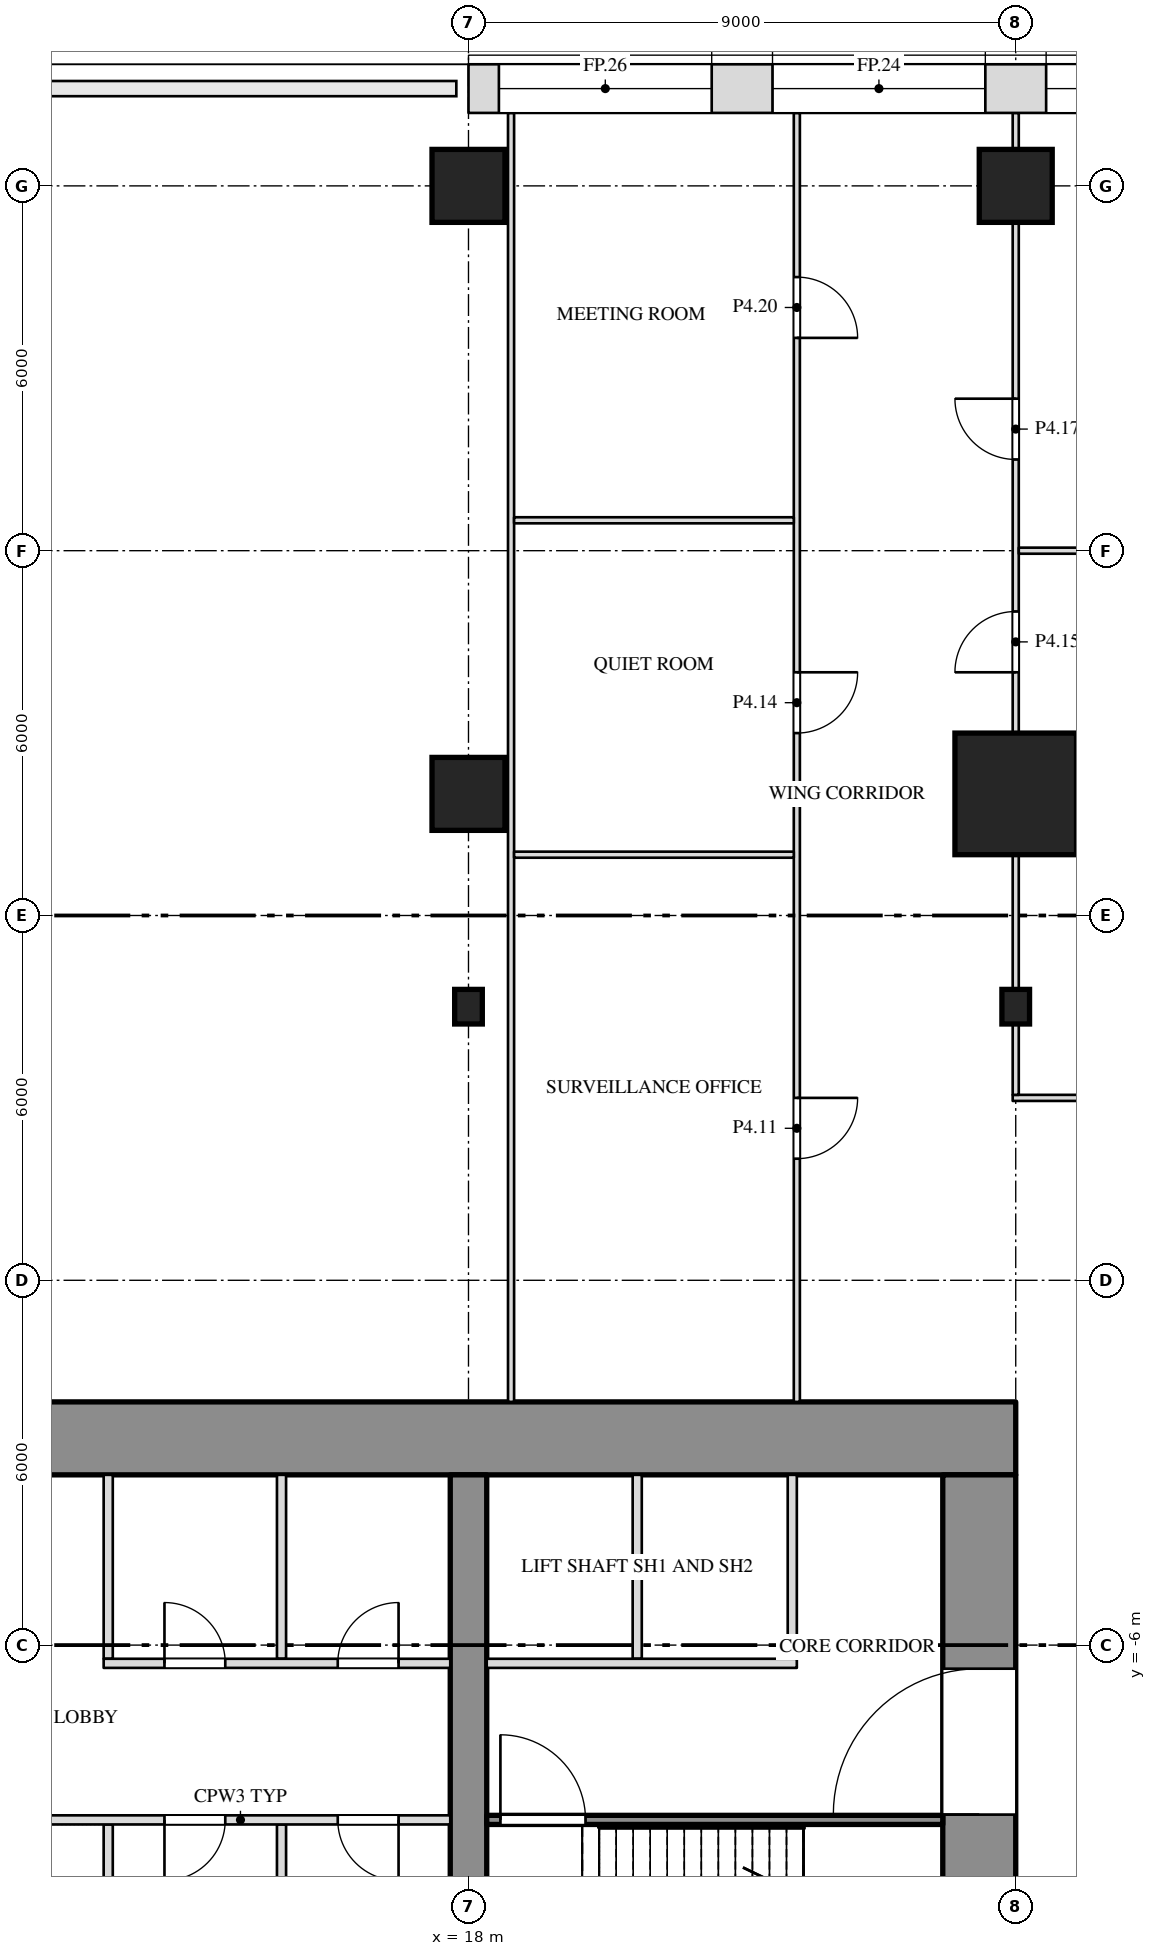
"""IFC4 building model, lengths in metres.
Left out: names, types, materials, properties, quantities, classifications, styles, units other than length and angle.
Written with IfcOpenShell. Run it as: python <this file> out.ifc"""

import sys

from ifc_helpers import new_model, si_unit, direction, frame, frame_2d, origin, origin_2d, place, context, subcontext, project, spatial, rectangle, i_section, extrude, element, fill, save


model = new_model("IFC4")
c1 = context("Model", 3, precision=1e-05, world=origin(), true_north=direction((0.0, 1.0)))
c2 = subcontext(c1, "Body", "Model", "MODEL_VIEW")
j1 = project(units=[si_unit("LENGTHUNIT", "METRE"), si_unit("PLANEANGLEUNIT", "RADIAN")], contexts=[c1])
p1 = place(None, origin())
s1 = spatial("IfcSite", under=j1, at=p1, CompositionType="ELEMENT")
p2 = place(p1, origin())
s2 = spatial("IfcBuilding", under=s1, at=p2, CompositionType="ELEMENT")
p3 = place(p2, frame((0.0, 0.0, 27.0)))
s3 = spatial("IfcBuildingStorey", under=s2, at=p3, CompositionType="ELEMENT", Elevation=27.0)
for number, where, z_axis, x_axis in (
    (1, (18.0, 4.5, 0.0), (0.0, 0.0, 1.0), (1.0, 0.0, 0.0)),
    (2, (27.0, 4.5, 0.0), (0.0, 0.0, 1.0), (1.0, 0.0, 0.0)),
):
    element("IfcColumn", number, at=place(p3, frame(where, z_axis=z_axis, x_axis=x_axis)), inside=s3, PredefinedType="COLUMN", context=c2, shape_type="SweptSolid", body=[
        extrude(i_section(OverallWidth=0.455, OverallDepth=0.569, WebThickness=0.078, FlangeThickness=0.125, at=origin_2d()), origin(), (0.0, 0.0, 1.0), 6.0),
    ])
p4 = place(p3, frame((18.0, 8.0, 0.0), z_axis=(0.0, 0.0, 1.0), x_axis=(1.0, 0.0, 0.0)))
e3 = element("IfcColumn", 3, at=p4, inside=s3, PredefinedType="COLUMN", context=c2, shape_type="SweptSolid", body=[
    extrude(rectangle(XDim=1.2, YDim=1.2, at=origin_2d()), origin(), (0.0, 0.0, 1.0), 6.0),
])
p5 = place(p3, frame((27.0, 8.0, 0.0), z_axis=(0.0, 0.0, 1.0), x_axis=(1.0, 0.0, 0.0)))
e4 = element("IfcColumn", 4, at=p5, inside=s3, PredefinedType="COLUMN", context=c2, shape_type="SweptSolid", body=[
    extrude(rectangle(XDim=2.0, YDim=2.0, at=origin_2d()), origin(), (0.0, 0.0, 1.0), 6.0),
])
for number, where, z_axis, x_axis in (
    (5, (18.0, 18.0, 0.0), (0.0, 0.0, 1.0), (1.0, 0.0, 0.0)),
    (6, (27.0, 18.0, 0.0), (0.0, 0.0, 1.0), (1.0, 0.0, 0.0)),
):
    element("IfcColumn", number, at=place(p3, frame(where, z_axis=z_axis, x_axis=x_axis)), inside=s3, PredefinedType="COLUMN", context=c2, shape_type="SweptSolid", body=[
        extrude(rectangle(XDim=1.2, YDim=1.2, at=origin_2d()), origin(), (0.0, 0.0, 1.0), 6.0),
    ])
p6 = place(p3, frame((-27.0, -2.6, 0.0), z_axis=(0.0, 0.0, 1.0), x_axis=(1.0, 0.0, 0.0)))
e7 = element("IfcWall", 7, at=p6, inside=s3, PredefinedType="SHEAR", context=c2, shape_type="SweptSolid", body=[
    extrude(rectangle(XDim=54.0, YDim=1.2, at=frame_2d((27.0, 0.0))), origin(), (0.0, 0.0, 1.0), 5.7),
])
p7 = place(p3, frame((26.4, -12.8, 0.0), z_axis=(0.0, 0.0, 1.0), x_axis=(0.0, 1.0, 0.0)))
e8 = element("IfcWall", 8, at=p7, inside=s3, PredefinedType="SHEAR", context=c2, shape_type="SweptSolid", body=[
    extrude(rectangle(XDim=9.6, YDim=1.2, at=frame_2d((4.8, 0.0))), origin(), (0.0, 0.0, 1.0), 5.7),
])
p8 = place(p7, frame((4.012, 0.0, 0.0)))
e9 = element("IfcOpeningElement", 9, at=p8, cuts=e8, PredefinedType="OPENING", context=c2, shape_type="SweptSolid", body=[
    extrude(rectangle(XDim=2.4, YDim=2.1, at=frame_2d((1.2, 1.05))), frame((0.0, 0.612, 0.0), z_axis=(0.0, -1.0, 0.0), x_axis=(1.0, 0.0, 0.0)), (0.0, 0.0, 1.0), 1.224),
])
p9 = place(p3, frame((18.0, -12.8, 0.0), z_axis=(0.0, 0.0, 1.0), x_axis=(0.0, 1.0, 0.0)))
e10 = element("IfcWall", 10, at=p9, inside=s3, PredefinedType="SHEAR", context=c2, shape_type="SweptSolid", body=[
    extrude(rectangle(XDim=9.6, YDim=0.6, at=frame_2d((4.8, 0.0))), origin(), (0.0, 0.0, 1.0), 5.7),
])
p10 = place(p3, frame((18.7, -2.0, 0.0), z_axis=(0.0, 0.0, 1.0), x_axis=(0.0, 1.0, 0.0)))
e11 = element("IfcWall", 11, at=p10, inside=s3, PredefinedType="PARTITIONING", context=c2, shape_type="SweptSolid", body=[
    extrude(rectangle(XDim=21.2, YDim=0.1, at=frame_2d((10.6, 0.0))), origin(), (0.0, 0.0, 1.0), 5.7),
])
p11 = place(p3, frame((23.4, -2.0, 0.0), z_axis=(0.0, 0.0, 1.0), x_axis=(0.0, 1.0, 0.0)))
e12 = element("IfcWall", 12, at=p11, inside=s3, PredefinedType="PARTITIONING", context=c2, shape_type="SweptSolid", body=[
    extrude(rectangle(XDim=21.2, YDim=0.1, at=frame_2d((10.6, 0.0))), origin(), (0.0, 0.0, 1.0), 5.7),
])
p12 = place(p11, frame((4.0, 0.0, 0.0)))
e13 = element("IfcOpeningElement", 13, at=p12, cuts=e12, PredefinedType="OPENING", context=c2, shape_type="SweptSolid", body=[
    extrude(rectangle(XDim=1.0, YDim=2.1, at=frame_2d((0.5, 1.05))), frame((0.0, 0.062, 0.0), z_axis=(0.0, -1.0, 0.0), x_axis=(1.0, 0.0, 0.0)), (0.0, 0.0, 1.0), 0.124),
])
p13 = place(p11, frame((11.0, 0.0, 0.0)))
e14 = element("IfcOpeningElement", 14, at=p13, cuts=e12, PredefinedType="OPENING", context=c2, shape_type="SweptSolid", body=[
    extrude(rectangle(XDim=1.0, YDim=2.1, at=frame_2d((0.5, 1.05))), frame((0.0, 0.062, 0.0), z_axis=(0.0, -1.0, 0.0), x_axis=(1.0, 0.0, 0.0)), (0.0, 0.0, 1.0), 0.124),
])
p14 = place(p11, frame((17.5, 0.0, 0.0)))
e15 = element("IfcOpeningElement", 15, at=p14, cuts=e12, PredefinedType="OPENING", context=c2, shape_type="SweptSolid", body=[
    extrude(rectangle(XDim=1.0, YDim=2.1, at=frame_2d((0.5, 1.05))), frame((0.0, 0.062, 0.0), z_axis=(0.0, -1.0, 0.0), x_axis=(1.0, 0.0, 0.0)), (0.0, 0.0, 1.0), 0.124),
])
p15 = place(p3, frame((26.95, 3.0, 0.0), z_axis=(0.0, 0.0, 1.0), x_axis=(1.0, 0.0, 0.0)))
e16 = element("IfcWall", 16, at=p15, inside=s3, PredefinedType="PARTITIONING", context=c2, shape_type="SweptSolid", body=[
    extrude(rectangle(XDim=11.25, YDim=0.1, at=frame_2d((5.625, 0.0))), origin(), (0.0, 0.0, 1.0), 5.7),
])
p16 = place(p3, frame((27.0, 3.05, 0.0), z_axis=(0.0, 0.0, 1.0), x_axis=(0.0, 1.0, 0.0)))
e17 = element("IfcWall", 17, at=p16, inside=s3, PredefinedType="PARTITIONING", context=c2, shape_type="SweptSolid", body=[
    extrude(rectangle(XDim=1.166, YDim=0.1, at=frame_2d((0.583, 0.0))), origin(), (0.0, 0.0, 1.0), 5.088),
])
p17 = place(p3, frame((27.0, 4.784, 0.0), z_axis=(0.0, 0.0, 1.0), x_axis=(0.0, 1.0, 0.0)))
e18 = element("IfcWall", 18, at=p17, inside=s3, PredefinedType="PARTITIONING", context=c2, shape_type="SweptSolid", body=[
    extrude(rectangle(XDim=2.216, YDim=0.1, at=frame_2d((1.108, 0.0))), origin(), (0.0, 0.0, 1.0), 5.088),
])
p18 = place(p3, frame((27.0, 9.0, 0.0), z_axis=(0.0, 0.0, 1.0), x_axis=(0.0, 1.0, 0.0)))
e19 = element("IfcWall", 19, at=p18, inside=s3, PredefinedType="PARTITIONING", context=c2, shape_type="SweptSolid", body=[
    extrude(rectangle(XDim=8.4, YDim=0.1, at=frame_2d((4.2, 0.0))), origin(), (0.0, 0.0, 1.0), 5.088),
])
p19 = place(p18, frame((1.0, 0.0, 0.0)))
e20 = element("IfcOpeningElement", 20, at=p19, cuts=e19, PredefinedType="OPENING", context=c2, shape_type="SweptSolid", body=[
    extrude(rectangle(XDim=1.0, YDim=2.1, at=frame_2d((0.5, 1.05))), frame((0.0, 0.062, 0.0), z_axis=(0.0, -1.0, 0.0), x_axis=(1.0, 0.0, 0.0)), (0.0, 0.0, 1.0), 0.124),
])
p20 = place(p18, frame((4.5, 0.0, 0.0)))
e21 = element("IfcOpeningElement", 21, at=p20, cuts=e19, PredefinedType="OPENING", context=c2, shape_type="SweptSolid", body=[
    extrude(rectangle(XDim=1.0, YDim=2.1, at=frame_2d((0.5, 1.05))), frame((0.0, 0.062, 0.0), z_axis=(0.0, -1.0, 0.0), x_axis=(1.0, 0.0, 0.0)), (0.0, 0.0, 1.0), 0.124),
])
p21 = place(p3, frame((27.0, 18.6, 0.0), z_axis=(0.0, 0.0, 1.0), x_axis=(0.0, 1.0, 0.0)))
e22 = element("IfcWall", 22, at=p21, inside=s3, PredefinedType="PARTITIONING", context=c2, shape_type="SweptSolid", body=[
    extrude(rectangle(XDim=0.6, YDim=0.1, at=frame_2d((0.3, 0.0))), origin(), (0.0, 0.0, 1.0), 5.7),
])
p22 = place(p3, frame((18.75, 7.0, 0.0), z_axis=(0.0, 0.0, 1.0), x_axis=(1.0, 0.0, 0.0)))
e23 = element("IfcWall", 23, at=p22, inside=s3, PredefinedType="PARTITIONING", context=c2, shape_type="SweptSolid", body=[
    extrude(rectangle(XDim=4.6, YDim=0.1, at=frame_2d((2.3, 0.0))), origin(), (0.0, 0.0, 1.0), 5.7),
])
p23 = place(p3, frame((27.05, 12.0, 0.0), z_axis=(0.0, 0.0, 1.0), x_axis=(1.0, 0.0, 0.0)))
e24 = element("IfcWall", 24, at=p23, inside=s3, PredefinedType="PARTITIONING", context=c2, shape_type="SweptSolid", body=[
    extrude(rectangle(XDim=11.15, YDim=0.1, at=frame_2d((5.575, 0.0))), origin(), (0.0, 0.0, 1.0), 5.7),
])
p24 = place(p3, frame((18.75, 12.5, 0.0), z_axis=(0.0, 0.0, 1.0), x_axis=(1.0, 0.0, 0.0)))
e25 = element("IfcWall", 25, at=p24, inside=s3, PredefinedType="PARTITIONING", context=c2, shape_type="SweptSolid", body=[
    extrude(rectangle(XDim=4.6, YDim=0.1, at=frame_2d((2.3, 0.0))), origin(), (0.0, 0.0, 1.0), 5.7),
])
p25 = place(p3, frame((32.948, 19.6, 0.0), z_axis=(0.0, 0.0, 1.0), x_axis=(-1.0, 0.0, 0.0)))
e26 = element("IfcWall", 26, at=p25, inside=s3, PredefinedType="SOLIDWALL", context=c2, shape_type="SweptSolid", body=[
    extrude(rectangle(XDim=14.948, YDim=0.8, at=frame_2d((7.474, 0.0))), origin(), (0.0, 0.0, 1.0), 5.7),
])
p26 = place(p25, frame((1.948, 0.0, 1.0)))
e27 = element("IfcOpeningElement", 27, at=p26, cuts=e26, PredefinedType="OPENING", context=c2, shape_type="SweptSolid", body=[
    extrude(rectangle(XDim=3.5, YDim=4.0, at=frame_2d((1.75, 2.0))), frame((0.0, 0.412, 0.0), z_axis=(0.0, -1.0, 0.0), x_axis=(1.0, 0.0, 0.0)), (0.0, 0.0, 1.0), 0.824),
])
p27 = place(p25, frame((6.448, 0.0, 1.0)))
e28 = element("IfcOpeningElement", 28, at=p27, cuts=e26, PredefinedType="OPENING", context=c2, shape_type="SweptSolid", body=[
    extrude(rectangle(XDim=3.5, YDim=4.0, at=frame_2d((1.75, 2.0))), frame((0.0, 0.412, 0.0), z_axis=(0.0, -1.0, 0.0), x_axis=(1.0, 0.0, 0.0)), (0.0, 0.0, 1.0), 0.824),
])
p28 = place(p25, frame((10.948, 0.0, 1.0)))
e29 = element("IfcOpeningElement", 29, at=p28, cuts=e26, PredefinedType="OPENING", context=c2, shape_type="SweptSolid", body=[
    extrude(rectangle(XDim=3.5, YDim=4.0, at=frame_2d((1.75, 2.0))), frame((0.0, 0.412, 0.0), z_axis=(0.0, -1.0, 0.0), x_axis=(1.0, 0.0, 0.0)), (0.0, 0.0, 1.0), 0.824),
])
for number, where, z_axis, x_axis in (
    (30, (12.075, -6.225, 0.0), (0.0, 0.0, 1.0), (0.0, 1.0, 0.0)),
    (31, (14.925, -6.225, 0.0), (0.0, 0.0, 1.0), (0.0, 1.0, 0.0)),
    (32, (20.775, -6.225, 0.0), (0.0, 0.0, 1.0), (0.0, 1.0, 0.0)),
    (33, (23.325, -6.225, 0.0), (0.0, 0.0, 1.0), (0.0, 1.0, 0.0)),
):
    element("IfcWall", number, at=place(p3, frame(where, z_axis=z_axis, x_axis=x_axis)), inside=s3, PredefinedType="PARTITIONING", context=c2, shape_type="SweptSolid", body=[
        extrude(rectangle(XDim=3.025, YDim=0.15, at=frame_2d((1.513, 0.0))), origin(), (0.0, 0.0, 1.0), 5.7),
    ])
for number, where, z_axis, x_axis in (
    (34, (12.075, -12.8, 0.0), (0.0, 0.0, 1.0), (0.0, 1.0, 0.0)),
    (35, (14.925, -12.8, 0.0), (0.0, 0.0, 1.0), (0.0, 1.0, 0.0)),
):
    element("IfcWall", number, at=place(p3, frame(where, z_axis=z_axis, x_axis=x_axis)), inside=s3, PredefinedType="PARTITIONING", context=c2, shape_type="SweptSolid", body=[
        extrude(rectangle(XDim=3.85, YDim=0.15, at=frame_2d((1.925, 0.0))), origin(), (0.0, 0.0, 1.0), 5.7),
    ])
p29 = place(p3, frame((12.0, -6.3, 0.0), z_axis=(0.0, 0.0, 1.0), x_axis=(1.0, 0.0, 0.0)))
e36 = element("IfcWall", 36, at=p29, inside=s3, PredefinedType="PARTITIONING", context=c2, shape_type="SweptSolid", body=[
    extrude(rectangle(XDim=5.7, YDim=0.15, at=frame_2d((2.85, 0.0))), origin(), (0.0, 0.0, 1.0), 5.7),
])
p30 = place(p29, frame((1.0, 0.0, 0.0)))
e37 = element("IfcOpeningElement", 37, at=p30, cuts=e36, PredefinedType="OPENING", context=c2, shape_type="SweptSolid", body=[
    extrude(rectangle(XDim=1.0, YDim=2.1, at=frame_2d((0.5, 1.05))), frame((0.0, 0.087, 0.0), z_axis=(0.0, -1.0, 0.0), x_axis=(1.0, 0.0, 0.0)), (0.0, 0.0, 1.0), 0.174),
])
p31 = place(p29, frame((3.85, 0.0, 0.0)))
e38 = element("IfcOpeningElement", 38, at=p31, cuts=e36, PredefinedType="OPENING", context=c2, shape_type="SweptSolid", body=[
    extrude(rectangle(XDim=1.0, YDim=2.1, at=frame_2d((0.5, 1.05))), frame((0.0, 0.087, 0.0), z_axis=(0.0, -1.0, 0.0), x_axis=(1.0, 0.0, 0.0)), (0.0, 0.0, 1.0), 0.174),
])
p32 = place(p3, frame((18.3, -6.3, 0.0), z_axis=(0.0, 0.0, 1.0), x_axis=(1.0, 0.0, 0.0)))
e39 = element("IfcWall", 39, at=p32, inside=s3, PredefinedType="PARTITIONING", context=c2, shape_type="SweptSolid", body=[
    extrude(rectangle(XDim=5.1, YDim=0.15, at=frame_2d((2.55, 0.0))), origin(), (0.0, 0.0, 1.0), 5.7),
])
p33 = place(p3, frame((10.8, -8.875, 0.0), z_axis=(0.0, 0.0, 1.0), x_axis=(1.0, 0.0, 0.0)))
e40 = element("IfcWall", 40, at=p33, inside=s3, PredefinedType="PARTITIONING", context=c2, shape_type="SweptSolid", body=[
    extrude(rectangle(XDim=6.9, YDim=0.15, at=frame_2d((3.45, 0.0))), origin(), (0.0, 0.0, 1.0), 5.7),
])
p34 = place(p33, frame((2.2, 0.0, 0.0)))
e41 = element("IfcOpeningElement", 41, at=p34, cuts=e40, PredefinedType="OPENING", context=c2, shape_type="SweptSolid", body=[
    extrude(rectangle(XDim=1.0, YDim=2.1, at=frame_2d((0.5, 1.05))), frame((0.0, 0.087, 0.0), z_axis=(0.0, -1.0, 0.0), x_axis=(1.0, 0.0, 0.0)), (0.0, 0.0, 1.0), 0.174),
])
p35 = place(p33, frame((5.05, 0.0, 0.0)))
e42 = element("IfcOpeningElement", 42, at=p35, cuts=e40, PredefinedType="OPENING", context=c2, shape_type="SweptSolid", body=[
    extrude(rectangle(XDim=1.0, YDim=2.1, at=frame_2d((0.5, 1.05))), frame((0.0, 0.087, 0.0), z_axis=(0.0, -1.0, 0.0), x_axis=(1.0, 0.0, 0.0)), (0.0, 0.0, 1.0), 0.174),
])
p36 = place(p3, frame((18.3, -8.875, 0.0), z_axis=(0.0, 0.0, 1.0), x_axis=(1.0, 0.0, 0.0)))
e43 = element("IfcWall", 43, at=p36, inside=s3, PredefinedType="SHEAR", context=c2, shape_type="SweptSolid", body=[
    extrude(rectangle(XDim=7.5, YDim=0.15, at=frame_2d((3.75, 0.0))), origin(), (0.0, 0.0, 1.0), 5.7),
])
p37 = place(p36, frame((0.225, 0.0, 0.0)))
e44 = element("IfcOpeningElement", 44, at=p37, cuts=e43, PredefinedType="OPENING", context=c2, shape_type="SweptSolid", body=[
    extrude(rectangle(XDim=1.4, YDim=2.1, at=frame_2d((0.7, 1.05))), frame((0.0, 0.087, 0.0), z_axis=(0.0, -1.0, 0.0), x_axis=(1.0, 0.0, 0.0)), (0.0, 0.0, 1.0), 0.174),
])
p38 = place(p12, origin())
e45 = element("IfcDoor", 45, at=p38, inside=s3, OperationType="SINGLE_SWING_LEFT", PredefinedType="DOOR", context=c2, shape_type="SweptSolid", body=[
    extrude(rectangle(XDim=1.0, YDim=2.1, at=frame_2d((0.5, 1.05))), frame((0.0, 0.025, 0.0), z_axis=(0.0, -1.0, 0.0), x_axis=(1.0, 0.0, 0.0)), (0.0, 0.0, 1.0), 0.05),
])
fill(e13, e45)
p39 = place(p13, origin())
e46 = element("IfcDoor", 46, at=p39, inside=s3, OperationType="SINGLE_SWING_LEFT", PredefinedType="DOOR", context=c2, shape_type="SweptSolid", body=[
    extrude(rectangle(XDim=1.0, YDim=2.1, at=frame_2d((0.5, 1.05))), frame((0.0, 0.025, 0.0), z_axis=(0.0, -1.0, 0.0), x_axis=(1.0, 0.0, 0.0)), (0.0, 0.0, 1.0), 0.05),
])
fill(e14, e46)
p40 = place(p19, origin())
e47 = element("IfcDoor", 47, at=p40, inside=s3, OperationType="SINGLE_SWING_LEFT", PredefinedType="DOOR", context=c2, shape_type="SweptSolid", body=[
    extrude(rectangle(XDim=1.0, YDim=2.1, at=frame_2d((0.5, 1.05))), frame((0.0, 0.025, 0.0), z_axis=(0.0, -1.0, 0.0), x_axis=(1.0, 0.0, 0.0)), (0.0, 0.0, 1.0), 0.05),
])
fill(e20, e47)
p41 = place(p20, origin())
e48 = element("IfcDoor", 48, at=p41, inside=s3, OperationType="SINGLE_SWING_RIGHT", PredefinedType="DOOR", context=c2, shape_type="SweptSolid", body=[
    extrude(rectangle(XDim=1.0, YDim=2.1, at=frame_2d((0.5, 1.05))), frame((0.0, 0.025, 0.0), z_axis=(0.0, -1.0, 0.0), x_axis=(1.0, 0.0, 0.0)), (0.0, 0.0, 1.0), 0.05),
])
fill(e21, e48)
p42 = place(p14, origin())
e49 = element("IfcDoor", 49, at=p42, inside=s3, OperationType="SINGLE_SWING_RIGHT", PredefinedType="DOOR", context=c2, shape_type="SweptSolid", body=[
    extrude(rectangle(XDim=1.0, YDim=2.1, at=frame_2d((0.5, 1.05))), frame((0.0, 0.025, 0.0), z_axis=(0.0, -1.0, 0.0), x_axis=(1.0, 0.0, 0.0)), (0.0, 0.0, 1.0), 0.05),
])
fill(e15, e49)
p43 = place(p26, origin())
e50 = element("IfcWindow", 50, at=p43, inside=s3, PartitioningType="SINGLE_PANEL", PredefinedType="WINDOW", context=c2, shape_type="SweptSolid", body=[
    extrude(rectangle(XDim=3.5, YDim=4.0, at=frame_2d((1.75, 2.0))), frame((0.0, 0.03, 0.0), z_axis=(0.0, -1.0, 0.0), x_axis=(1.0, 0.0, 0.0)), (0.0, 0.0, 1.0), 0.06),
])
fill(e27, e50)
p44 = place(p27, origin())
e51 = element("IfcWindow", 51, at=p44, inside=s3, PartitioningType="SINGLE_PANEL", PredefinedType="WINDOW", context=c2, shape_type="SweptSolid", body=[
    extrude(rectangle(XDim=3.5, YDim=4.0, at=frame_2d((1.75, 2.0))), frame((0.0, 0.03, 0.0), z_axis=(0.0, -1.0, 0.0), x_axis=(1.0, 0.0, 0.0)), (0.0, 0.0, 1.0), 0.06),
])
fill(e28, e51)
p45 = place(p28, origin())
e52 = element("IfcWindow", 52, at=p45, inside=s3, PartitioningType="SINGLE_PANEL", PredefinedType="WINDOW", context=c2, shape_type="SweptSolid", body=[
    extrude(rectangle(XDim=3.5, YDim=4.0, at=frame_2d((1.75, 2.0))), frame((0.0, 0.03, 0.0), z_axis=(0.0, -1.0, 0.0), x_axis=(1.0, 0.0, 0.0)), (0.0, 0.0, 1.0), 0.06),
])
fill(e29, e52)
p46 = place(p34, origin())
e53 = element("IfcDoor", 53, at=p46, inside=s3, OperationType="SINGLE_SWING_RIGHT", PredefinedType="DOOR", context=c2, shape_type="SweptSolid", body=[
    extrude(rectangle(XDim=1.0, YDim=2.1, at=frame_2d((0.5, 1.05))), frame((0.0, 0.025, 0.0), z_axis=(0.0, -1.0, 0.0), x_axis=(1.0, 0.0, 0.0)), (0.0, 0.0, 1.0), 0.05),
])
fill(e41, e53)
p47 = place(p30, origin())
e54 = element("IfcDoor", 54, at=p47, inside=s3, OperationType="SINGLE_SWING_LEFT", PredefinedType="DOOR", context=c2, shape_type="SweptSolid", body=[
    extrude(rectangle(XDim=1.0, YDim=2.1, at=frame_2d((0.5, 1.05))), frame((0.0, 0.025, 0.0), z_axis=(0.0, -1.0, 0.0), x_axis=(1.0, 0.0, 0.0)), (0.0, 0.0, 1.0), 0.05),
])
fill(e37, e54)
p48 = place(p35, origin())
e55 = element("IfcDoor", 55, at=p48, inside=s3, OperationType="SINGLE_SWING_LEFT", PredefinedType="DOOR", context=c2, shape_type="SweptSolid", body=[
    extrude(rectangle(XDim=1.0, YDim=2.1, at=frame_2d((0.5, 1.05))), frame((0.0, 0.025, 0.0), z_axis=(0.0, -1.0, 0.0), x_axis=(1.0, 0.0, 0.0)), (0.0, 0.0, 1.0), 0.05),
])
fill(e42, e55)
p49 = place(p31, origin())
e56 = element("IfcDoor", 56, at=p49, inside=s3, OperationType="SINGLE_SWING_RIGHT", PredefinedType="DOOR", context=c2, shape_type="SweptSolid", body=[
    extrude(rectangle(XDim=1.0, YDim=2.1, at=frame_2d((0.5, 1.05))), frame((0.0, 0.025, 0.0), z_axis=(0.0, -1.0, 0.0), x_axis=(1.0, 0.0, 0.0)), (0.0, 0.0, 1.0), 0.05),
])
fill(e38, e56)
p50 = place(p37, origin())
e57 = element("IfcDoor", 57, at=p50, inside=s3, OperationType="DOUBLE_DOOR_SINGLE_SWING", PredefinedType="DOOR", context=c2, shape_type="SweptSolid", body=[
    extrude(rectangle(XDim=1.4, YDim=2.1, at=frame_2d((0.7, 1.05))), frame((0.0, 0.025, 0.0), z_axis=(0.0, -1.0, 0.0), x_axis=(1.0, 0.0, 0.0)), (0.0, 0.0, 1.0), 0.05),
])
fill(e44, e57)
p51 = place(p8, origin())
e58 = element("IfcDoor", 58, at=p51, inside=s3, OperationType="DOUBLE_DOOR_SINGLE_SWING", PredefinedType="DOOR", context=c2, shape_type="SweptSolid", body=[
    extrude(rectangle(XDim=2.4, YDim=2.1, at=frame_2d((1.2, 1.05))), frame((0.0, 0.025, 0.0), z_axis=(0.0, -1.0, 0.0), x_axis=(1.0, 0.0, 0.0)), (0.0, 0.0, 1.0), 0.05),
])
fill(e9, e58)
save(model, sys.argv[1])
